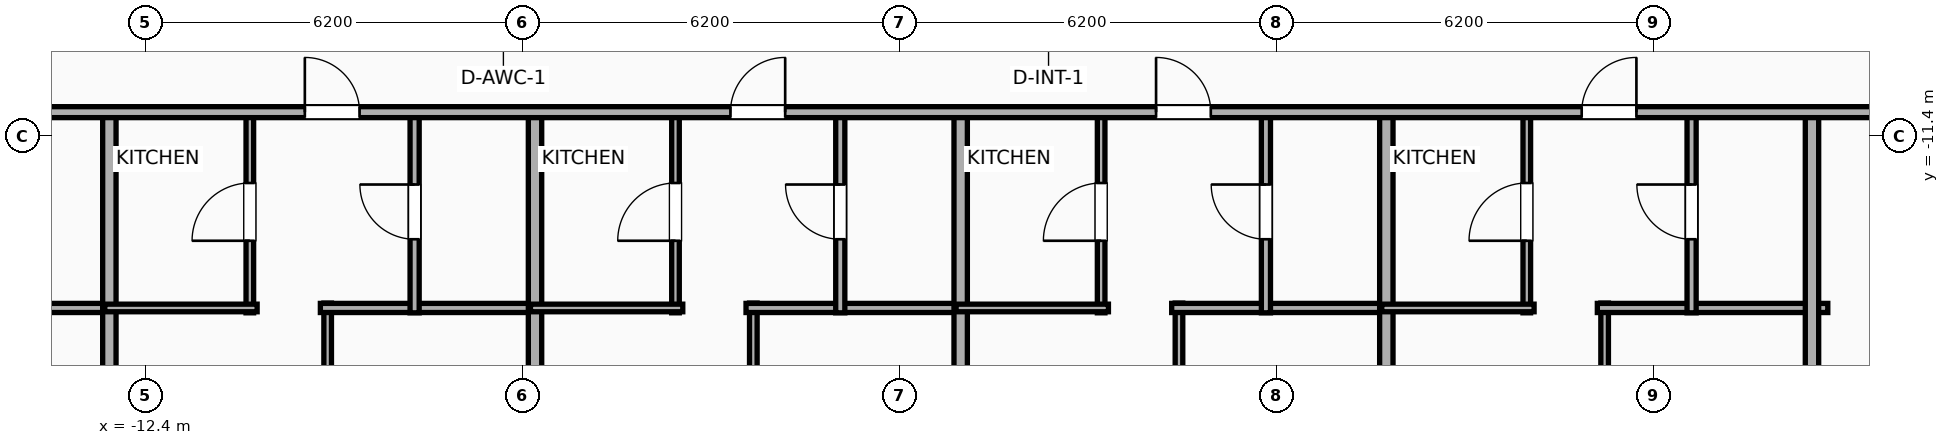
"""IFC4 building model, lengths in metres.
Left out: names, types, materials, properties, quantities, classifications, styles, units other than length and angle.
Written with IfcOpenShell. Run it as: python <this file> out.ifc"""

import sys

from ifc_helpers import new_model, si_unit, direction, frame, frame_2d, origin, place, context, subcontext, project, spatial, rectangle, extrude, element, fill, save


model = new_model("IFC4")
c1 = context("Model", 3, precision=1e-05, world=origin(), true_north=direction((0.0, 1.0)))
c2 = subcontext(c1, "Body", "Model", "MODEL_VIEW")
j1 = project(units=[si_unit("LENGTHUNIT", "METRE"), si_unit("PLANEANGLEUNIT", "RADIAN")], contexts=[c1])
p1 = place(None, origin())
s1 = spatial("IfcSite", under=j1, at=p1, CompositionType="ELEMENT")
p2 = place(p1, origin())
s2 = spatial("IfcBuilding", under=s1, at=p2, CompositionType="ELEMENT")
p3 = place(p2, frame((0.0, 0.0, 65.0)))
s3 = spatial("IfcBuildingStorey", under=s2, at=p3, CompositionType="ELEMENT", Elevation=65.0)
p4 = place(p3, frame((-16.53, -14.22, 0.0), z_axis=(0.0, 0.0, 1.0), x_axis=(1.0, 0.0, 0.0)))
e1 = element("IfcWall", 1, at=p4, inside=s3, PredefinedType="PLUMBINGWALL", context=c2, shape_type="SweptSolid", body=[
    extrude(rectangle(XDim=3.605, YDim=0.15, at=frame_2d((1.802, 0.0))), origin(), (0.0, 0.0, 1.0), 3.65),
])
p5 = place(p3, frame((-13.0, -22.21, 0.0), z_axis=(0.0, 0.0, 1.0), x_axis=(0.0, 1.0, 0.0)))
e2 = element("IfcWall", 2, at=p5, inside=s3, PredefinedType="PARTITIONING", context=c2, shape_type="SweptSolid", body=[
    extrude(rectangle(XDim=11.29, YDim=0.22, at=frame_2d((5.645, 0.0))), origin(), (0.0, 0.0, 1.0), 3.65),
])
p6 = place(p3, frame((-9.41, -22.36, 0.0), z_axis=(0.0, 0.0, 1.0), x_axis=(0.0, 1.0, 0.0)))
e3 = element("IfcWall", 3, at=p6, inside=s3, PredefinedType="PARTITIONING", context=c2, shape_type="SweptSolid", body=[
    extrude(rectangle(XDim=8.22, YDim=0.125, at=frame_2d((4.11, 0.0))), origin(), (0.0, 0.0, 1.0), 2.94),
])
p7 = place(p6, frame((5.797, 0.0, 0.0)))
e4 = element("IfcOpeningElement", 4, at=p7, cuts=e3, PredefinedType="OPENING", context=c2, shape_type="SweptSolid", body=[
    extrude(rectangle(XDim=0.9, YDim=2.05, at=frame_2d((0.45, 1.025))), frame((0.0, 0.073, 0.0), z_axis=(0.0, -1.0, 0.0), x_axis=(1.0, 0.0, 0.0)), (0.0, 0.0, 1.0), 0.145),
])
p8 = place(p3, frame((-9.53, -14.22, 0.0), z_axis=(0.0, 0.0, 1.0), x_axis=(1.0, 0.0, 0.0)))
e5 = element("IfcWall", 5, at=p8, inside=s3, PredefinedType="PLUMBINGWALL", context=c2, shape_type="SweptSolid", body=[
    extrude(rectangle(XDim=3.605, YDim=0.15, at=frame_2d((1.802, 0.0))), origin(), (0.0, 0.0, 1.0), 3.65),
])
p9 = place(p3, frame((-10.69, -14.3, 0.0), z_axis=(0.0, 0.0, 1.0), x_axis=(0.0, 1.0, 0.0)))
e6 = element("IfcWall", 6, at=p9, inside=s3, PredefinedType="PARTITIONING", context=c2, shape_type="SweptSolid", body=[
    extrude(rectangle(XDim=3.32, YDim=0.125, at=frame_2d((1.66, 0.0))), origin(), (0.0, 0.0, 1.0), 2.94),
])
p10 = place(p9, frame((1.185, 0.0, 0.0)))
e7 = element("IfcOpeningElement", 7, at=p10, cuts=e6, PredefinedType="OPENING", context=c2, shape_type="SweptSolid", body=[
    extrude(rectangle(XDim=0.95, YDim=2.05, at=frame_2d((0.475, 1.025))), frame((0.0, 0.073, 0.0), z_axis=(0.0, -1.0, 0.0), x_axis=(1.0, 0.0, 0.0)), (0.0, 0.0, 1.0), 0.145),
])
p11 = place(p3, frame((-13.075, -14.22, 0.0), z_axis=(0.0, 0.0, 1.0), x_axis=(1.0, 0.0, 0.0)))
e8 = element("IfcWall", 8, at=p11, inside=s3, PredefinedType="PARTITIONING", context=c2, shape_type="SweptSolid", body=[
    extrude(rectangle(XDim=2.505, YDim=0.125, at=frame_2d((1.252, 0.0))), origin(), (0.0, 0.0, 1.0), 3.65),
])
p12 = place(p3, frame((-7.98, -14.3, 0.0), z_axis=(0.0, 0.0, 1.0), x_axis=(0.0, 1.0, 0.0)))
e9 = element("IfcWall", 9, at=p12, inside=s3, PredefinedType="PLUMBINGWALL", context=c2, shape_type="SweptSolid", body=[
    extrude(rectangle(XDim=3.32, YDim=0.15, at=frame_2d((1.66, 0.0))), origin(), (0.0, 0.0, 1.0), 3.65),
])
p13 = place(p12, frame((1.21, 0.0, 0.0)))
e10 = element("IfcOpeningElement", 10, at=p13, cuts=e9, PredefinedType="OPENING", context=c2, shape_type="SweptSolid", body=[
    extrude(rectangle(XDim=0.9, YDim=2.05, at=frame_2d((0.45, 1.025))), frame((0.0, 0.085, 0.0), z_axis=(0.0, -1.0, 0.0), x_axis=(1.0, 0.0, 0.0)), (0.0, 0.0, 1.0), 0.17),
])
p14 = place(p3, frame((-6.0, -22.21, 0.0), z_axis=(0.0, 0.0, 1.0), x_axis=(0.0, 1.0, 0.0)))
e11 = element("IfcWall", 11, at=p14, inside=s3, PredefinedType="PARTITIONING", context=c2, shape_type="SweptSolid", body=[
    extrude(rectangle(XDim=11.29, YDim=0.22, at=frame_2d((5.645, 0.0))), origin(), (0.0, 0.0, 1.0), 3.65),
])
p15 = place(p3, frame((-2.41, -22.36, 0.0), z_axis=(0.0, 0.0, 1.0), x_axis=(0.0, 1.0, 0.0)))
e12 = element("IfcWall", 12, at=p15, inside=s3, PredefinedType="PARTITIONING", context=c2, shape_type="SweptSolid", body=[
    extrude(rectangle(XDim=8.22, YDim=0.125, at=frame_2d((4.11, 0.0))), origin(), (0.0, 0.0, 1.0), 3.65),
])
p16 = place(p15, frame((5.797, 0.0, 0.0)))
e13 = element("IfcOpeningElement", 13, at=p16, cuts=e12, PredefinedType="OPENING", context=c2, shape_type="SweptSolid", body=[
    extrude(rectangle(XDim=0.9, YDim=2.05, at=frame_2d((0.45, 1.025))), frame((0.0, 0.073, 0.0), z_axis=(0.0, -1.0, 0.0), x_axis=(1.0, 0.0, 0.0)), (0.0, 0.0, 1.0), 0.145),
])
p17 = place(p3, frame((-2.53, -14.22, 0.0), z_axis=(0.0, 0.0, 1.0), x_axis=(1.0, 0.0, 0.0)))
e14 = element("IfcWall", 14, at=p17, inside=s3, PredefinedType="PLUMBINGWALL", context=c2, shape_type="SweptSolid", body=[
    extrude(rectangle(XDim=3.605, YDim=0.15, at=frame_2d((1.802, 0.0))), origin(), (0.0, 0.0, 1.0), 3.65),
])
p18 = place(p3, frame((-3.69, -14.3, 0.0), z_axis=(0.0, 0.0, 1.0), x_axis=(0.0, 1.0, 0.0)))
e15 = element("IfcWall", 15, at=p18, inside=s3, PredefinedType="PARTITIONING", context=c2, shape_type="SweptSolid", body=[
    extrude(rectangle(XDim=3.32, YDim=0.125, at=frame_2d((1.66, 0.0))), origin(), (0.0, 0.0, 1.0), 3.65),
])
p19 = place(p18, frame((1.185, 0.0, 0.0)))
e16 = element("IfcOpeningElement", 16, at=p19, cuts=e15, PredefinedType="OPENING", context=c2, shape_type="SweptSolid", body=[
    extrude(rectangle(XDim=0.95, YDim=2.05, at=frame_2d((0.475, 1.025))), frame((0.0, 0.073, 0.0), z_axis=(0.0, -1.0, 0.0), x_axis=(1.0, 0.0, 0.0)), (0.0, 0.0, 1.0), 0.145),
])
p20 = place(p3, frame((-6.075, -14.22, 0.0), z_axis=(0.0, 0.0, 1.0), x_axis=(1.0, 0.0, 0.0)))
e17 = element("IfcWall", 17, at=p20, inside=s3, PredefinedType="PARTITIONING", context=c2, shape_type="SweptSolid", body=[
    extrude(rectangle(XDim=2.505, YDim=0.125, at=frame_2d((1.252, 0.0))), origin(), (0.0, 0.0, 1.0), 3.65),
])
p21 = place(p3, frame((-0.98, -14.3, 0.0), z_axis=(0.0, 0.0, 1.0), x_axis=(0.0, 1.0, 0.0)))
e18 = element("IfcWall", 18, at=p21, inside=s3, PredefinedType="PLUMBINGWALL", context=c2, shape_type="SweptSolid", body=[
    extrude(rectangle(XDim=3.32, YDim=0.15, at=frame_2d((1.66, 0.0))), origin(), (0.0, 0.0, 1.0), 3.65),
])
p22 = place(p21, frame((1.21, 0.0, 0.0)))
e19 = element("IfcOpeningElement", 19, at=p22, cuts=e18, PredefinedType="OPENING", context=c2, shape_type="SweptSolid", body=[
    extrude(rectangle(XDim=0.9, YDim=2.05, at=frame_2d((0.45, 1.025))), frame((0.0, 0.085, 0.0), z_axis=(0.0, -1.0, 0.0), x_axis=(1.0, 0.0, 0.0)), (0.0, 0.0, 1.0), 0.17),
])
p23 = place(p3, frame((1.0, -22.21, 0.0), z_axis=(0.0, 0.0, 1.0), x_axis=(0.0, 1.0, 0.0)))
e20 = element("IfcWall", 20, at=p23, inside=s3, PredefinedType="PARTITIONING", context=c2, shape_type="SweptSolid", body=[
    extrude(rectangle(XDim=11.29, YDim=0.22, at=frame_2d((5.645, 0.0))), origin(), (0.0, 0.0, 1.0), 3.65),
])
p24 = place(p3, frame((4.59, -22.36, 0.0), z_axis=(0.0, 0.0, 1.0), x_axis=(0.0, 1.0, 0.0)))
e21 = element("IfcWall", 21, at=p24, inside=s3, PredefinedType="PARTITIONING", context=c2, shape_type="SweptSolid", body=[
    extrude(rectangle(XDim=8.22, YDim=0.125, at=frame_2d((4.11, 0.0))), origin(), (0.0, 0.0, 1.0), 3.65),
])
p25 = place(p24, frame((5.797, 0.0, 0.0)))
e22 = element("IfcOpeningElement", 22, at=p25, cuts=e21, PredefinedType="OPENING", context=c2, shape_type="SweptSolid", body=[
    extrude(rectangle(XDim=0.9, YDim=2.05, at=frame_2d((0.45, 1.025))), frame((0.0, 0.073, 0.0), z_axis=(0.0, -1.0, 0.0), x_axis=(1.0, 0.0, 0.0)), (0.0, 0.0, 1.0), 0.145),
])
p26 = place(p3, frame((4.47, -14.22, 0.0), z_axis=(0.0, 0.0, 1.0), x_axis=(1.0, 0.0, 0.0)))
e23 = element("IfcWall", 23, at=p26, inside=s3, PredefinedType="PLUMBINGWALL", context=c2, shape_type="SweptSolid", body=[
    extrude(rectangle(XDim=3.605, YDim=0.15, at=frame_2d((1.802, 0.0))), origin(), (0.0, 0.0, 1.0), 3.65),
])
p27 = place(p3, frame((3.31, -14.3, 0.0), z_axis=(0.0, 0.0, 1.0), x_axis=(0.0, 1.0, 0.0)))
e24 = element("IfcWall", 24, at=p27, inside=s3, PredefinedType="PARTITIONING", context=c2, shape_type="SweptSolid", body=[
    extrude(rectangle(XDim=3.32, YDim=0.125, at=frame_2d((1.66, 0.0))), origin(), (0.0, 0.0, 1.0), 2.94),
])
p28 = place(p27, frame((1.185, 0.0, 0.0)))
e25 = element("IfcOpeningElement", 25, at=p28, cuts=e24, PredefinedType="OPENING", context=c2, shape_type="SweptSolid", body=[
    extrude(rectangle(XDim=0.95, YDim=2.05, at=frame_2d((0.475, 1.025))), frame((0.0, 0.073, 0.0), z_axis=(0.0, -1.0, 0.0), x_axis=(1.0, 0.0, 0.0)), (0.0, 0.0, 1.0), 0.145),
])
p29 = place(p3, frame((0.925, -14.22, 0.0), z_axis=(0.0, 0.0, 1.0), x_axis=(1.0, 0.0, 0.0)))
e26 = element("IfcWall", 26, at=p29, inside=s3, PredefinedType="PARTITIONING", context=c2, shape_type="SweptSolid", body=[
    extrude(rectangle(XDim=2.505, YDim=0.125, at=frame_2d((1.252, 0.0))), origin(), (0.0, 0.0, 1.0), 3.65),
])
p30 = place(p3, frame((6.02, -14.3, 0.0), z_axis=(0.0, 0.0, 1.0), x_axis=(0.0, 1.0, 0.0)))
e27 = element("IfcWall", 27, at=p30, inside=s3, PredefinedType="PLUMBINGWALL", context=c2, shape_type="SweptSolid", body=[
    extrude(rectangle(XDim=3.32, YDim=0.15, at=frame_2d((1.66, 0.0))), origin(), (0.0, 0.0, 1.0), 3.65),
])
p31 = place(p30, frame((1.21, 0.0, 0.0)))
e28 = element("IfcOpeningElement", 28, at=p31, cuts=e27, PredefinedType="OPENING", context=c2, shape_type="SweptSolid", body=[
    extrude(rectangle(XDim=0.9, YDim=2.05, at=frame_2d((0.45, 1.025))), frame((0.0, 0.085, 0.0), z_axis=(0.0, -1.0, 0.0), x_axis=(1.0, 0.0, 0.0)), (0.0, 0.0, 1.0), 0.17),
])
p32 = place(p3, frame((8.0, -22.21, 0.0), z_axis=(0.0, 0.0, 1.0), x_axis=(0.0, 1.0, 0.0)))
e29 = element("IfcWall", 29, at=p32, inside=s3, PredefinedType="PARTITIONING", context=c2, shape_type="SweptSolid", body=[
    extrude(rectangle(XDim=11.29, YDim=0.22, at=frame_2d((5.645, 0.0))), origin(), (0.0, 0.0, 1.0), 3.65),
])
p33 = place(p3, frame((11.59, -22.36, 0.0), z_axis=(0.0, 0.0, 1.0), x_axis=(0.0, 1.0, 0.0)))
e30 = element("IfcWall", 30, at=p33, inside=s3, PredefinedType="PARTITIONING", context=c2, shape_type="SweptSolid", body=[
    extrude(rectangle(XDim=8.22, YDim=0.125, at=frame_2d((4.11, 0.0))), origin(), (0.0, 0.0, 1.0), 3.65),
])
p34 = place(p33, frame((5.797, 0.0, 0.0)))
e31 = element("IfcOpeningElement", 31, at=p34, cuts=e30, PredefinedType="OPENING", context=c2, shape_type="SweptSolid", body=[
    extrude(rectangle(XDim=0.9, YDim=2.05, at=frame_2d((0.45, 1.025))), frame((0.0, 0.073, 0.0), z_axis=(0.0, -1.0, 0.0), x_axis=(1.0, 0.0, 0.0)), (0.0, 0.0, 1.0), 0.145),
])
p35 = place(p3, frame((11.47, -14.22, 0.0), z_axis=(0.0, 0.0, 1.0), x_axis=(1.0, 0.0, 0.0)))
e32 = element("IfcWall", 32, at=p35, inside=s3, PredefinedType="PLUMBINGWALL", context=c2, shape_type="SweptSolid", body=[
    extrude(rectangle(XDim=3.79, YDim=0.15, at=frame_2d((1.895, 0.0))), origin(), (0.0, 0.0, 1.0), 3.65),
])
p36 = place(p3, frame((10.31, -14.3, 0.0), z_axis=(0.0, 0.0, 1.0), x_axis=(0.0, 1.0, 0.0)))
e33 = element("IfcWall", 33, at=p36, inside=s3, PredefinedType="PARTITIONING", context=c2, shape_type="SweptSolid", body=[
    extrude(rectangle(XDim=3.32, YDim=0.125, at=frame_2d((1.66, 0.0))), origin(), (0.0, 0.0, 1.0), 3.65),
])
p37 = place(p36, frame((1.185, 0.0, 0.0)))
e34 = element("IfcOpeningElement", 34, at=p37, cuts=e33, PredefinedType="OPENING", context=c2, shape_type="SweptSolid", body=[
    extrude(rectangle(XDim=0.95, YDim=2.05, at=frame_2d((0.475, 1.025))), frame((0.0, 0.073, 0.0), z_axis=(0.0, -1.0, 0.0), x_axis=(1.0, 0.0, 0.0)), (0.0, 0.0, 1.0), 0.145),
])
p38 = place(p3, frame((7.925, -14.22, 0.0), z_axis=(0.0, 0.0, 1.0), x_axis=(1.0, 0.0, 0.0)))
e35 = element("IfcWall", 35, at=p38, inside=s3, PredefinedType="PARTITIONING", context=c2, shape_type="SweptSolid", body=[
    extrude(rectangle(XDim=2.505, YDim=0.125, at=frame_2d((1.252, 0.0))), origin(), (0.0, 0.0, 1.0), 3.65),
])
p39 = place(p3, frame((13.02, -14.3, 0.0), z_axis=(0.0, 0.0, 1.0), x_axis=(0.0, 1.0, 0.0)))
e36 = element("IfcWall", 36, at=p39, inside=s3, PredefinedType="PLUMBINGWALL", context=c2, shape_type="SweptSolid", body=[
    extrude(rectangle(XDim=3.32, YDim=0.15, at=frame_2d((1.66, 0.0))), origin(), (0.0, 0.0, 1.0), 3.65),
])
p40 = place(p39, frame((1.21, 0.0, 0.0)))
e37 = element("IfcOpeningElement", 37, at=p40, cuts=e36, PredefinedType="OPENING", context=c2, shape_type="SweptSolid", body=[
    extrude(rectangle(XDim=0.9, YDim=2.05, at=frame_2d((0.45, 1.025))), frame((0.0, 0.085, 0.0), z_axis=(0.0, -1.0, 0.0), x_axis=(1.0, 0.0, 0.0)), (0.0, 0.0, 1.0), 0.17),
])
p41 = place(p3, frame((15.0, -22.21, 0.0), z_axis=(0.0, 0.0, 1.0), x_axis=(0.0, 1.0, 0.0)))
e38 = element("IfcWall", 38, at=p41, inside=s3, PredefinedType="PARTITIONING", context=c2, shape_type="SweptSolid", body=[
    extrude(rectangle(XDim=11.29, YDim=0.22, at=frame_2d((5.645, 0.0))), origin(), (0.0, 0.0, 1.0), 3.65),
])
p42 = place(p3, frame((-33.41, -11.0, 0.0), z_axis=(0.0, 0.0, 1.0), x_axis=(1.0, 0.0, 0.0)))
e39 = element("IfcWall", 39, at=p42, inside=s3, PredefinedType="PARTITIONING", context=c2, shape_type="SweptSolid", body=[
    extrude(rectangle(XDim=59.62, YDim=0.18, at=frame_2d((29.81, 0.0))), origin(), (0.0, 0.0, 1.0), 3.65),
])
p43 = place(p42, frame((3.08, 0.0, 0.0)))
e40 = element("IfcOpeningElement", 40, at=p43, cuts=e39, PredefinedType="OPENING", context=c2, shape_type="SweptSolid", body=[
    extrude(rectangle(XDim=0.9, YDim=2.05, at=frame_2d((0.45, 1.025))), frame((0.0, 0.1, 0.0), z_axis=(0.0, -1.0, 0.0), x_axis=(1.0, 0.0, 0.0)), (0.0, 0.0, 1.0), 0.2),
])
p44 = place(p42, frame((9.918, 0.0, 0.0)))
e41 = element("IfcOpeningElement", 41, at=p44, cuts=e39, PredefinedType="OPENING", context=c2, shape_type="SweptSolid", body=[
    extrude(rectangle(XDim=0.9, YDim=2.05, at=frame_2d((0.45, 1.025))), frame((0.0, 0.1, 0.0), z_axis=(0.0, -1.0, 0.0), x_axis=(1.0, 0.0, 0.0)), (0.0, 0.0, 1.0), 0.2),
])
p45 = place(p42, frame((16.721, 0.0, 0.0)))
e42 = element("IfcOpeningElement", 42, at=p45, cuts=e39, PredefinedType="OPENING", context=c2, shape_type="SweptSolid", body=[
    extrude(rectangle(XDim=0.9, YDim=2.05, at=frame_2d((0.45, 1.025))), frame((0.0, 0.1, 0.0), z_axis=(0.0, -1.0, 0.0), x_axis=(1.0, 0.0, 0.0)), (0.0, 0.0, 1.0), 0.2),
])
p46 = place(p42, frame((23.625, 0.0, 0.0)))
e43 = element("IfcOpeningElement", 43, at=p46, cuts=e39, PredefinedType="OPENING", context=c2, shape_type="SweptSolid", body=[
    extrude(rectangle(XDim=0.9, YDim=2.05, at=frame_2d((0.45, 1.025))), frame((0.0, 0.1, 0.0), z_axis=(0.0, -1.0, 0.0), x_axis=(1.0, 0.0, 0.0)), (0.0, 0.0, 1.0), 0.2),
])
p47 = place(p42, frame((30.624, 0.0, 0.0)))
e44 = element("IfcOpeningElement", 44, at=p47, cuts=e39, PredefinedType="OPENING", context=c2, shape_type="SweptSolid", body=[
    extrude(rectangle(XDim=0.9, YDim=2.05, at=frame_2d((0.45, 1.025))), frame((0.0, 0.1, 0.0), z_axis=(0.0, -1.0, 0.0), x_axis=(1.0, 0.0, 0.0)), (0.0, 0.0, 1.0), 0.2),
])
p48 = place(p42, frame((37.623, 0.0, 0.0)))
e45 = element("IfcOpeningElement", 45, at=p48, cuts=e39, PredefinedType="OPENING", context=c2, shape_type="SweptSolid", body=[
    extrude(rectangle(XDim=0.9, YDim=2.05, at=frame_2d((0.45, 1.025))), frame((0.0, 0.1, 0.0), z_axis=(0.0, -1.0, 0.0), x_axis=(1.0, 0.0, 0.0)), (0.0, 0.0, 1.0), 0.2),
])
p49 = place(p42, frame((44.623, 0.0, 0.0)))
e46 = element("IfcOpeningElement", 46, at=p49, cuts=e39, PredefinedType="OPENING", context=c2, shape_type="SweptSolid", body=[
    extrude(rectangle(XDim=0.9, YDim=2.05, at=frame_2d((0.45, 1.025))), frame((0.0, 0.1, 0.0), z_axis=(0.0, -1.0, 0.0), x_axis=(1.0, 0.0, 0.0)), (0.0, 0.0, 1.0), 0.2),
])
p50 = place(p42, frame((49.565, 0.0, 0.0)))
e47 = element("IfcOpeningElement", 47, at=p50, cuts=e39, PredefinedType="OPENING", context=c2, shape_type="SweptSolid", body=[
    extrude(rectangle(XDim=1.15, YDim=2.05, at=frame_2d((0.575, 1.025))), frame((0.0, 0.1, 0.0), z_axis=(0.0, -1.0, 0.0), x_axis=(1.0, 0.0, 0.0)), (0.0, 0.0, 1.0), 0.2),
])
p51 = place(p42, frame((56.583, 0.0, 0.0)))
e48 = element("IfcOpeningElement", 48, at=p51, cuts=e39, PredefinedType="OPENING", context=c2, shape_type="SweptSolid", body=[
    extrude(rectangle(XDim=0.9, YDim=2.05, at=frame_2d((0.45, 1.025))), frame((0.0, 0.1, 0.0), z_axis=(0.0, -1.0, 0.0), x_axis=(1.0, 0.0, 0.0)), (0.0, 0.0, 1.0), 0.2),
])
p52 = place(p10, origin())
e49 = element("IfcDoor", 49, at=p52, inside=s3, OperationType="SINGLE_SWING_LEFT", PredefinedType="DOOR", context=c2, shape_type="SweptSolid", body=[
    extrude(rectangle(XDim=0.95, YDim=2.05, at=frame_2d((0.475, 1.025))), frame((0.0, 0.025, 0.0), z_axis=(0.0, -1.0, 0.0), x_axis=(1.0, 0.0, 0.0)), (0.0, 0.0, 1.0), 0.05),
])
fill(e7, e49)
p53 = place(p13, origin())
e50 = element("IfcDoor", 50, at=p53, inside=s3, OperationType="SINGLE_SWING_RIGHT", PredefinedType="DOOR", context=c2, shape_type="SweptSolid", body=[
    extrude(rectangle(XDim=0.9, YDim=2.05, at=frame_2d((0.45, 1.025))), frame((0.0, 0.025, 0.0), z_axis=(0.0, -1.0, 0.0), x_axis=(1.0, 0.0, 0.0)), (0.0, 0.0, 1.0), 0.05),
])
fill(e10, e50)
p54 = place(p19, origin())
e51 = element("IfcDoor", 51, at=p54, inside=s3, OperationType="SINGLE_SWING_LEFT", PredefinedType="DOOR", context=c2, shape_type="SweptSolid", body=[
    extrude(rectangle(XDim=0.95, YDim=2.05, at=frame_2d((0.475, 1.025))), frame((0.0, 0.025, 0.0), z_axis=(0.0, -1.0, 0.0), x_axis=(1.0, 0.0, 0.0)), (0.0, 0.0, 1.0), 0.05),
])
fill(e16, e51)
p55 = place(p22, origin())
e52 = element("IfcDoor", 52, at=p55, inside=s3, OperationType="SINGLE_SWING_RIGHT", PredefinedType="DOOR", context=c2, shape_type="SweptSolid", body=[
    extrude(rectangle(XDim=0.9, YDim=2.05, at=frame_2d((0.45, 1.025))), frame((0.0, 0.025, 0.0), z_axis=(0.0, -1.0, 0.0), x_axis=(1.0, 0.0, 0.0)), (0.0, 0.0, 1.0), 0.05),
])
fill(e19, e52)
p56 = place(p28, origin())
e53 = element("IfcDoor", 53, at=p56, inside=s3, OperationType="SINGLE_SWING_LEFT", PredefinedType="DOOR", context=c2, shape_type="SweptSolid", body=[
    extrude(rectangle(XDim=0.95, YDim=2.05, at=frame_2d((0.475, 1.025))), frame((0.0, 0.025, 0.0), z_axis=(0.0, -1.0, 0.0), x_axis=(1.0, 0.0, 0.0)), (0.0, 0.0, 1.0), 0.05),
])
fill(e25, e53)
p57 = place(p31, origin())
e54 = element("IfcDoor", 54, at=p57, inside=s3, OperationType="SINGLE_SWING_RIGHT", PredefinedType="DOOR", context=c2, shape_type="SweptSolid", body=[
    extrude(rectangle(XDim=0.9, YDim=2.05, at=frame_2d((0.45, 1.025))), frame((0.0, 0.025, 0.0), z_axis=(0.0, -1.0, 0.0), x_axis=(1.0, 0.0, 0.0)), (0.0, 0.0, 1.0), 0.05),
])
fill(e28, e54)
p58 = place(p37, origin())
e55 = element("IfcDoor", 55, at=p58, inside=s3, OperationType="SINGLE_SWING_LEFT", PredefinedType="DOOR", context=c2, shape_type="SweptSolid", body=[
    extrude(rectangle(XDim=0.95, YDim=2.05, at=frame_2d((0.475, 1.025))), frame((0.0, 0.025, 0.0), z_axis=(0.0, -1.0, 0.0), x_axis=(1.0, 0.0, 0.0)), (0.0, 0.0, 1.0), 0.05),
])
fill(e34, e55)
p59 = place(p40, origin())
e56 = element("IfcDoor", 56, at=p59, inside=s3, OperationType="SINGLE_SWING_RIGHT", PredefinedType="DOOR", context=c2, shape_type="SweptSolid", body=[
    extrude(rectangle(XDim=0.9, YDim=2.05, at=frame_2d((0.45, 1.025))), frame((0.0, 0.025, 0.0), z_axis=(0.0, -1.0, 0.0), x_axis=(1.0, 0.0, 0.0)), (0.0, 0.0, 1.0), 0.05),
])
fill(e37, e56)
p60 = place(p46, origin())
e57 = element("IfcDoor", 57, at=p60, inside=s3, OperationType="SINGLE_SWING_LEFT", PredefinedType="DOOR", context=c2, shape_type="SweptSolid", body=[
    extrude(rectangle(XDim=0.9, YDim=2.05, at=frame_2d((0.45, 1.025))), frame((0.0, 0.025, 0.0), z_axis=(0.0, -1.0, 0.0), x_axis=(1.0, 0.0, 0.0)), (0.0, 0.0, 1.0), 0.05),
])
fill(e43, e57)
p61 = place(p47, origin())
e58 = element("IfcDoor", 58, at=p61, inside=s3, OperationType="SINGLE_SWING_RIGHT", PredefinedType="DOOR", context=c2, shape_type="SweptSolid", body=[
    extrude(rectangle(XDim=0.9, YDim=2.05, at=frame_2d((0.45, 1.025))), frame((0.0, 0.025, 0.0), z_axis=(0.0, -1.0, 0.0), x_axis=(1.0, 0.0, 0.0)), (0.0, 0.0, 1.0), 0.05),
])
fill(e44, e58)
p62 = place(p48, origin())
e59 = element("IfcDoor", 59, at=p62, inside=s3, OperationType="SINGLE_SWING_LEFT", PredefinedType="DOOR", context=c2, shape_type="SweptSolid", body=[
    extrude(rectangle(XDim=0.9, YDim=2.05, at=frame_2d((0.45, 1.025))), frame((0.0, 0.025, 0.0), z_axis=(0.0, -1.0, 0.0), x_axis=(1.0, 0.0, 0.0)), (0.0, 0.0, 1.0), 0.05),
])
fill(e45, e59)
p63 = place(p49, origin())
e60 = element("IfcDoor", 60, at=p63, inside=s3, OperationType="SINGLE_SWING_RIGHT", PredefinedType="DOOR", context=c2, shape_type="SweptSolid", body=[
    extrude(rectangle(XDim=0.9, YDim=2.05, at=frame_2d((0.45, 1.025))), frame((0.0, 0.025, 0.0), z_axis=(0.0, -1.0, 0.0), x_axis=(1.0, 0.0, 0.0)), (0.0, 0.0, 1.0), 0.05),
])
fill(e46, e60)
save(model, sys.argv[1])
